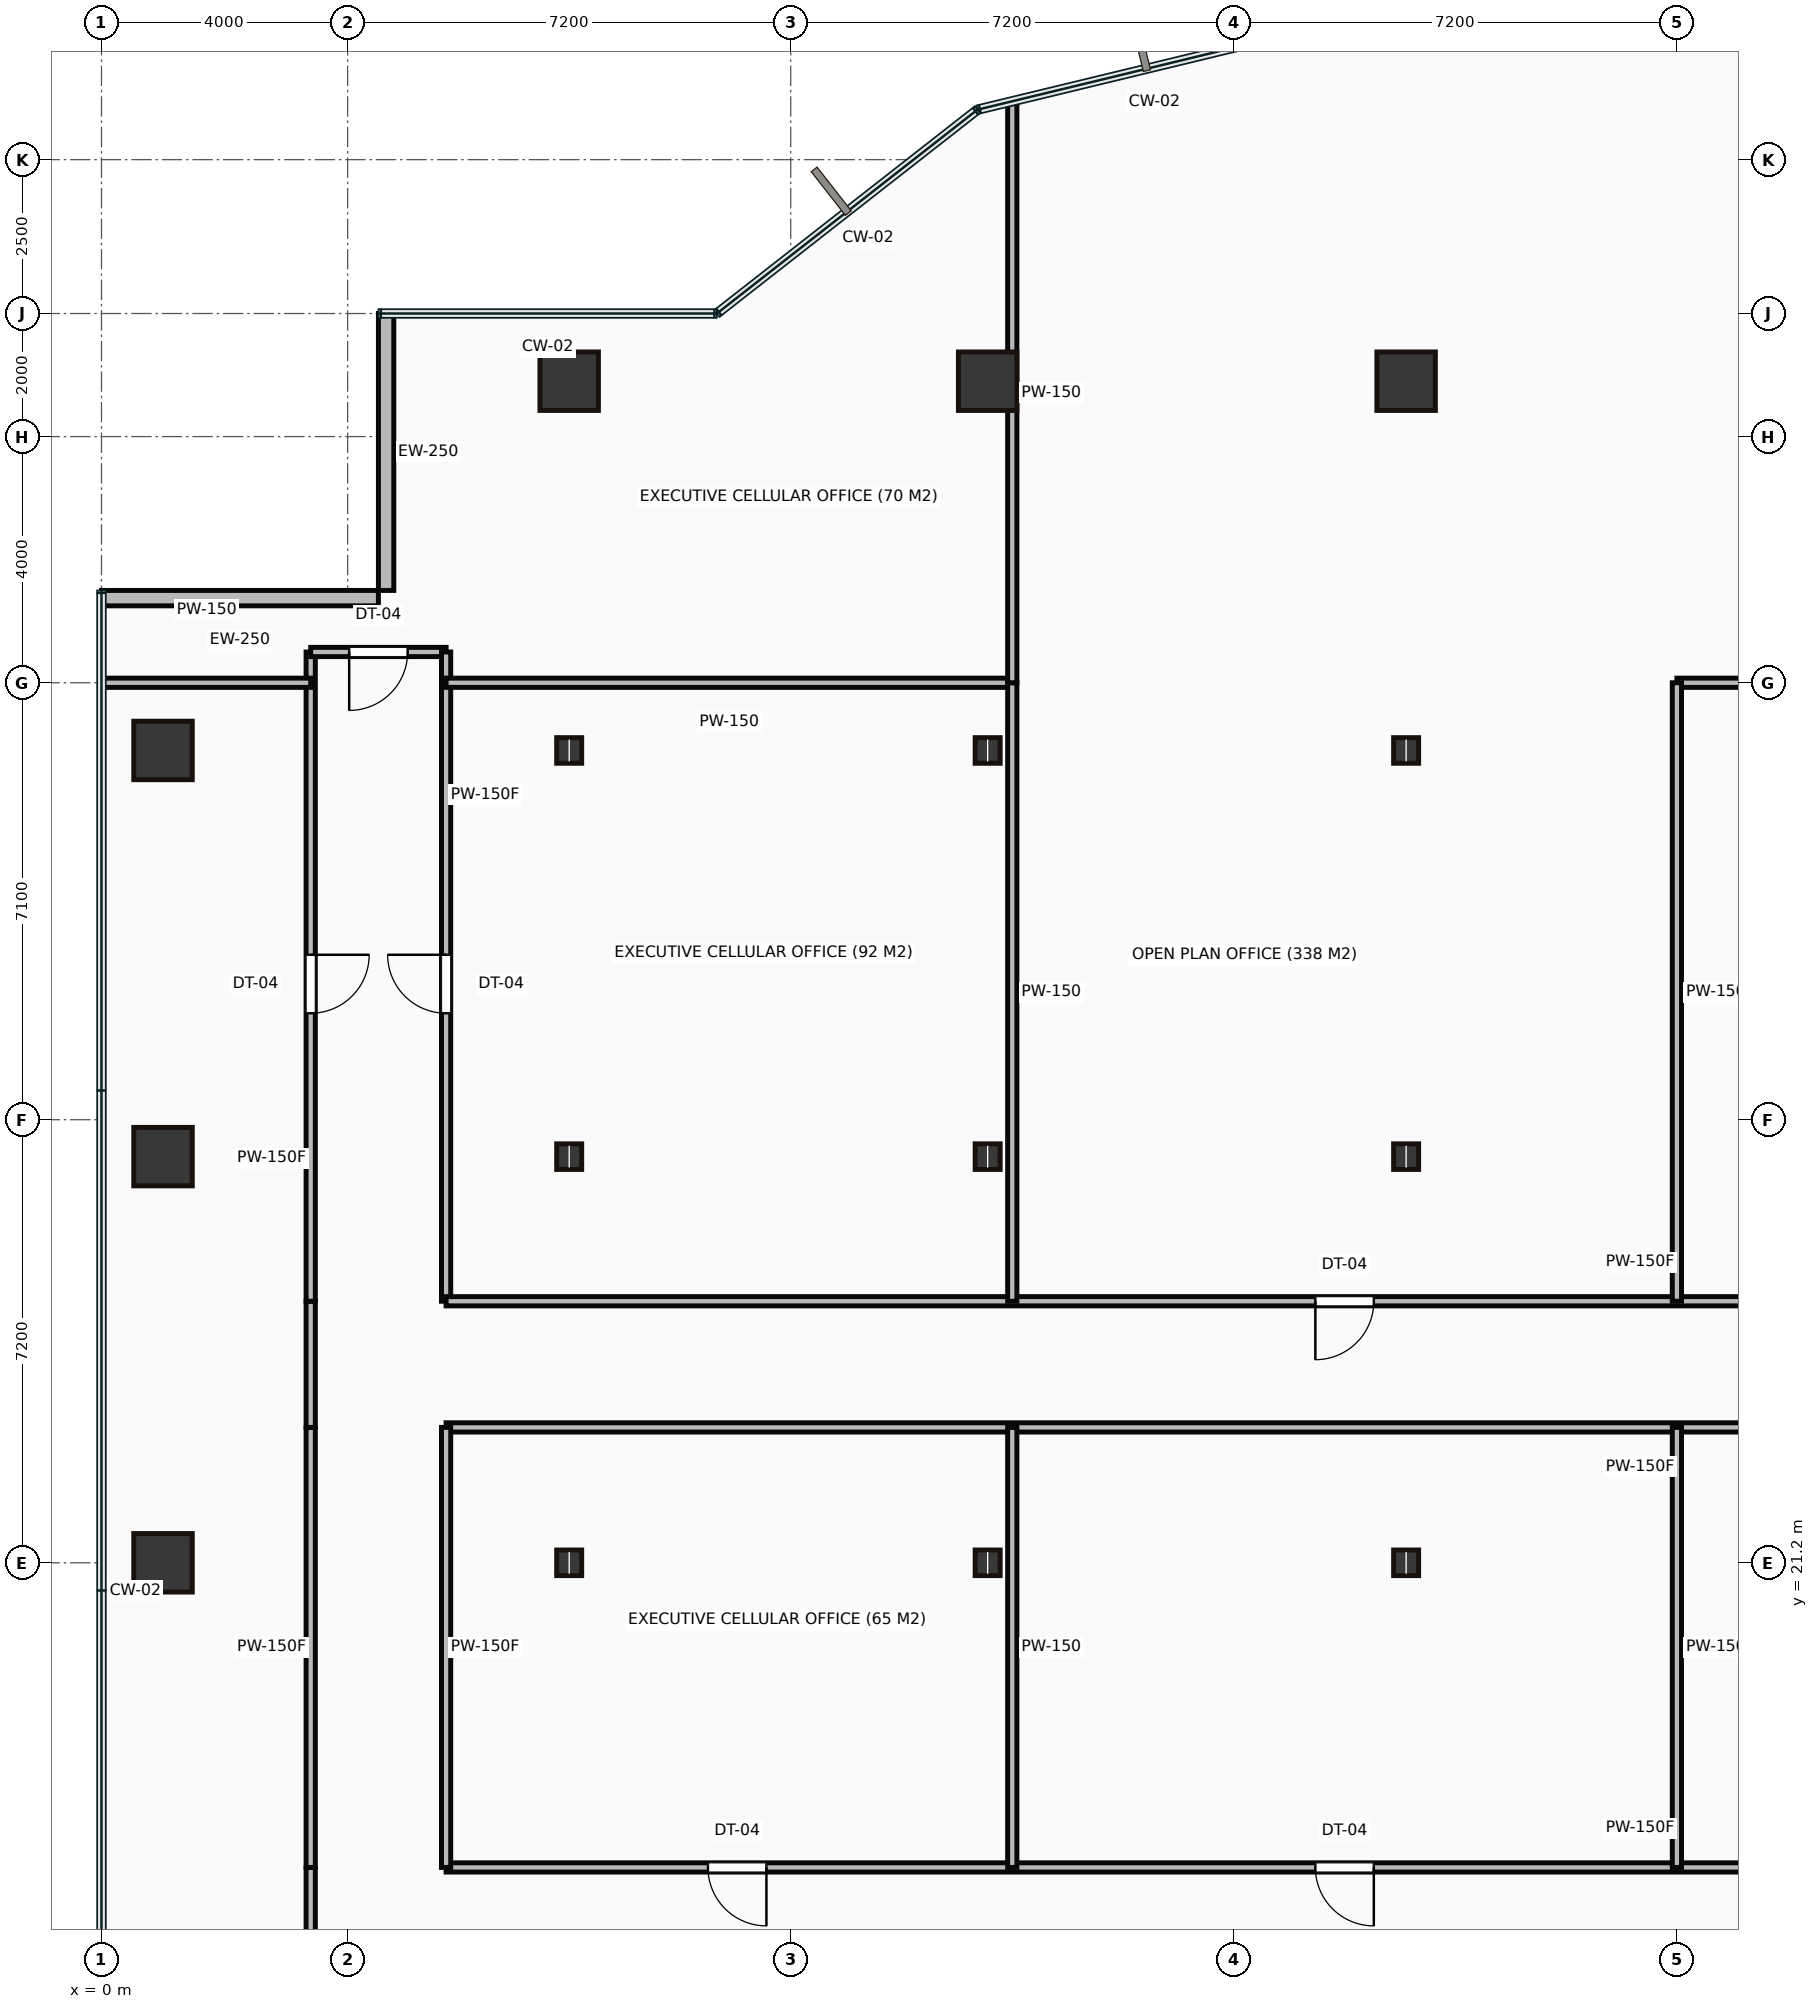
"""IFC4 building model, lengths in metres.
Left out: names, types, materials, properties, quantities, classifications, styles, units other than length and angle.
Written with IfcOpenShell. Run it as: python <this file> out.ifc"""

import sys

from ifc_helpers import new_model, si_unit, direction, frame, frame_2d, origin, origin_2d, place, context, subcontext, project, spatial, rectangle, hollow_rectangle, i_section, extrude, source, transform, mapped, element, fill, save


model = new_model("IFC4")
c1 = context("Model", 3, precision=1e-05, world=origin(), true_north=direction((0.0, 1.0)))
c2 = subcontext(c1, "Body", "Model", "MODEL_VIEW")
j1 = project(units=[si_unit("LENGTHUNIT", "METRE"), si_unit("PLANEANGLEUNIT", "RADIAN")], contexts=[c1])
p1 = place(None, origin())
s1 = spatial("IfcSite", under=j1, at=p1, CompositionType="ELEMENT")
p2 = place(p1, origin())
s2 = spatial("IfcBuilding", under=s1, at=p2, CompositionType="ELEMENT")
p3 = place(p2, frame((0.0, 0.0, 32.5)))
s3 = spatial("IfcBuildingStorey", under=s2, at=p3, CompositionType="ELEMENT", Elevation=32.5)
m1 = source(origin(), c2, "Body", "SweptSolid", [
    extrude(hollow_rectangle(XDim=0.95, YDim=0.95, WallThickness=0.045, at=origin_2d()), origin(), (0.0, 0.0, 1.0), 3.65),
])
for number, where, z_axis, x_axis in (
    (1, (1.0, 21.2, 0.0), (0.0, 0.0, 1.0), (1.0, 0.0, 0.0)),
    (2, (1.0, 27.8, 0.0), (0.0, 0.0, 1.0), (1.0, 0.0, 0.0)),
    (3, (1.0, 34.4, 0.0), (0.0, 0.0, 1.0), (1.0, 0.0, 0.0)),
):
    element("IfcColumn", number, at=place(p3, frame(where, z_axis=z_axis, x_axis=x_axis)), inside=s3, PredefinedType="COLUMN", context=c2, shape_type="MappedRepresentation", body=[
        mapped(m1, transform((0.0, 0.0, 0.0))),
    ])
m2 = source(origin(), c2, "Body", "SweptSolid", [
    extrude(i_section(OverallWidth=0.406, OverallDepth=0.416, WebThickness=0.03, FlangeThickness=0.048, at=origin_2d()), origin(), (0.0, 0.0, 1.0), 3.65),
])
for number, where, z_axis, x_axis in (
    (4, (7.6, 21.2, 0.0), (0.0, 0.0, 1.0), (1.0, 0.0, 0.0)),
    (5, (7.6, 27.8, 0.0), (0.0, 0.0, 1.0), (1.0, 0.0, 0.0)),
    (6, (7.6, 34.4, 0.0), (0.0, 0.0, 1.0), (1.0, 0.0, 0.0)),
):
    element("IfcColumn", number, at=place(p3, frame(where, z_axis=z_axis, x_axis=x_axis)), inside=s3, PredefinedType="COLUMN", context=c2, shape_type="MappedRepresentation", body=[
        mapped(m2, transform((0.0, 0.0, 0.0))),
    ])
p4 = place(p3, frame((7.6, 40.4, 0.0), z_axis=(0.0, 0.0, 1.0), x_axis=(1.0, 0.0, 0.0)))
e7 = element("IfcColumn", 7, at=p4, inside=s3, PredefinedType="COLUMN", context=c2, shape_type="MappedRepresentation", body=[
    mapped(m1, transform((0.0, 0.0, 0.0))),
])
for number, where, z_axis, x_axis in (
    (8, (14.4, 21.2, 0.0), (0.0, 0.0, 1.0), (1.0, 0.0, 0.0)),
    (9, (14.4, 27.8, 0.0), (0.0, 0.0, 1.0), (1.0, 0.0, 0.0)),
    (10, (14.4, 34.4, 0.0), (0.0, 0.0, 1.0), (1.0, 0.0, 0.0)),
):
    element("IfcColumn", number, at=place(p3, frame(where, z_axis=z_axis, x_axis=x_axis)), inside=s3, PredefinedType="COLUMN", context=c2, shape_type="MappedRepresentation", body=[
        mapped(m2, transform((0.0, 0.0, 0.0))),
    ])
p5 = place(p3, frame((14.4, 40.4, 0.0), z_axis=(0.0, 0.0, 1.0), x_axis=(1.0, 0.0, 0.0)))
e11 = element("IfcColumn", 11, at=p5, inside=s3, PredefinedType="COLUMN", context=c2, shape_type="MappedRepresentation", body=[
    mapped(m1, transform((0.0, 0.0, 0.0))),
])
for number, where, z_axis, x_axis in (
    (12, (21.2, 21.2, 0.0), (0.0, 0.0, 1.0), (1.0, 0.0, 0.0)),
    (13, (21.2, 27.8, 0.0), (0.0, 0.0, 1.0), (1.0, 0.0, 0.0)),
    (14, (21.2, 34.4, 0.0), (0.0, 0.0, 1.0), (1.0, 0.0, 0.0)),
):
    element("IfcColumn", number, at=place(p3, frame(where, z_axis=z_axis, x_axis=x_axis)), inside=s3, PredefinedType="COLUMN", context=c2, shape_type="MappedRepresentation", body=[
        mapped(m2, transform((0.0, 0.0, 0.0))),
    ])
p6 = place(p3, frame((21.2, 40.4, 0.0), z_axis=(0.0, 0.0, 1.0), x_axis=(1.0, 0.0, 0.0)))
e15 = element("IfcColumn", 15, at=p6, inside=s3, PredefinedType="COLUMN", context=c2, shape_type="MappedRepresentation", body=[
    mapped(m1, transform((0.0, 0.0, 0.0))),
])
m3 = source(origin(), c2, "Body", "SweptSolid", [
    extrude(rectangle(XDim=4.5, YDim=0.25, at=frame_2d((2.25, 0.0))), origin(), (0.0, 0.0, 1.0), 3.4),
])
for number, where, z_axis, x_axis in (
    (16, (4.625, 41.5, 0.0), (0.0, 0.0, 1.0), (0.0, -1.0, 0.0)),
    (17, (4.5, 36.875, 0.0), (0.0, 0.0, 1.0), (-1.0, 0.0, 0.0)),
):
    element("IfcWall", number, at=place(p3, frame(where, z_axis=z_axis, x_axis=x_axis)), inside=s3, PredefinedType="STANDARD", context=c2, shape_type="MappedRepresentation", body=[
        mapped(m3, transform((0.0, 0.0, 0.0))),
    ])
m4 = source(origin(), c2, "Body", "SweptSolid", [
    extrude(rectangle(XDim=2.25, YDim=0.15, at=frame_2d((1.125, 0.0))), origin(), (0.0, 0.0, 1.0), 3.4),
])
p7 = place(p3, frame((3.4, 14.0, 0.0), z_axis=(0.0, 0.0, 1.0), x_axis=(0.0, 1.0, 0.0)))
e18 = element("IfcWall", 18, at=p7, inside=s3, PredefinedType="PARTITIONING", context=c2, shape_type="MappedRepresentation", body=[
    mapped(m4, transform((0.0, 0.0, 0.0))),
])
m5 = source(origin(), c2, "Body", "SweptSolid", [
    extrude(rectangle(XDim=7.15, YDim=0.15, at=frame_2d((3.575, 0.0))), origin(), (0.0, 0.0, 1.0), 3.4),
])
p8 = place(p3, frame((3.4, 16.25, 0.0), z_axis=(0.0, 0.0, 1.0), x_axis=(0.0, 1.0, 0.0)))
e19 = element("IfcWall", 19, at=p8, inside=s3, PredefinedType="PARTITIONING", context=c2, shape_type="MappedRepresentation", body=[
    mapped(m5, transform((0.0, 0.0, 0.0))),
])
m6 = source(origin(), c2, "Body", "SweptSolid", [
    extrude(rectangle(XDim=2.05, YDim=0.15, at=frame_2d((1.025, 0.0))), origin(), (0.0, 0.0, 1.0), 3.4),
])
p9 = place(p3, frame((3.4, 23.4, 0.0), z_axis=(0.0, 0.0, 1.0), x_axis=(0.0, 1.0, 0.0)))
e20 = element("IfcWall", 20, at=p9, inside=s3, PredefinedType="PARTITIONING", context=c2, shape_type="MappedRepresentation", body=[
    mapped(m6, transform((0.0, 0.0, 0.0))),
])
m7 = source(origin(), c2, "Body", "SweptSolid", [
    extrude(rectangle(XDim=10.55, YDim=0.15, at=frame_2d((5.275, 0.0))), origin(), (0.0, 0.0, 1.0), 3.4),
])
p10 = place(p3, frame((3.4, 25.45, 0.0), z_axis=(0.0, 0.0, 1.0), x_axis=(0.0, 1.0, 0.0)))
e21 = element("IfcWall", 21, at=p10, inside=s3, PredefinedType="PARTITIONING", context=c2, shape_type="MappedRepresentation", body=[
    mapped(m7, transform((0.0, 0.0, 0.0))),
])
p11 = place(p10, frame((4.68, 0.0, 0.0)))
e22 = element("IfcOpeningElement", 22, at=p11, cuts=e21, PredefinedType="OPENING", context=c2, shape_type="SweptSolid", body=[
    extrude(rectangle(XDim=0.95, YDim=2.15, at=frame_2d((0.475, 1.075))), frame((0.0, 0.085, 0.0), z_axis=(0.0, -1.0, 0.0), x_axis=(1.0, 0.0, 0.0)), (0.0, 0.0, 1.0), 0.17),
])
m8 = source(origin(), c2, "Body", "SweptSolid", [
    extrude(rectangle(XDim=2.2, YDim=0.15, at=frame_2d((1.1, 0.0))), origin(), (0.0, 0.0, 1.0), 3.4),
])
p12 = place(p3, frame((3.4, 36.0, 0.0), z_axis=(0.0, 0.0, 1.0), x_axis=(1.0, 0.0, 0.0)))
e23 = element("IfcWall", 23, at=p12, inside=s3, PredefinedType="PARTITIONING", context=c2, shape_type="MappedRepresentation", body=[
    mapped(m8, transform((0.0, 0.0, 0.0))),
])
p13 = place(p12, frame((0.625, 0.0, 0.0)))
e24 = element("IfcOpeningElement", 24, at=p13, cuts=e23, PredefinedType="OPENING", context=c2, shape_type="SweptSolid", body=[
    extrude(rectangle(XDim=0.95, YDim=2.15, at=frame_2d((0.475, 1.075))), frame((0.0, 0.085, 0.0), z_axis=(0.0, -1.0, 0.0), x_axis=(1.0, 0.0, 0.0)), (0.0, 0.0, 1.0), 0.17),
])
p14 = place(p3, frame((5.6, 36.0, 0.0), z_axis=(0.0, 0.0, 1.0), x_axis=(0.0, -1.0, 0.0)))
e25 = element("IfcWall", 25, at=p14, inside=s3, PredefinedType="PARTITIONING", context=c2, shape_type="MappedRepresentation", body=[
    mapped(m7, transform((0.0, 0.0, 0.0))),
])
p15 = place(p14, frame((4.92, 0.0, 0.0)))
e26 = element("IfcOpeningElement", 26, at=p15, cuts=e25, PredefinedType="OPENING", context=c2, shape_type="SweptSolid", body=[
    extrude(rectangle(XDim=0.95, YDim=2.15, at=frame_2d((0.475, 1.075))), frame((0.0, 0.085, 0.0), z_axis=(0.0, -1.0, 0.0), x_axis=(1.0, 0.0, 0.0)), (0.0, 0.0, 1.0), 0.17),
])
m9 = source(origin(), c2, "Body", "SweptSolid", [
    extrude(rectangle(XDim=38.8, YDim=0.15, at=frame_2d((19.4, 0.0))), origin(), (0.0, 0.0, 1.0), 3.4),
])
p16 = place(p3, frame((5.6, 25.45, 0.0), z_axis=(0.0, 0.0, 1.0), x_axis=(1.0, 0.0, 0.0)))
e27 = element("IfcWall", 27, at=p16, inside=s3, PredefinedType="PARTITIONING", context=c2, shape_type="MappedRepresentation", body=[
    mapped(m9, transform((0.0, 0.0, 0.0))),
])
p17 = place(p16, frame((14.125, 0.0, 0.0)))
e28 = element("IfcOpeningElement", 28, at=p17, cuts=e27, PredefinedType="OPENING", context=c2, shape_type="SweptSolid", body=[
    extrude(rectangle(XDim=0.95, YDim=2.15, at=frame_2d((0.475, 1.075))), frame((0.0, 0.085, 0.0), z_axis=(0.0, -1.0, 0.0), x_axis=(1.0, 0.0, 0.0)), (0.0, 0.0, 1.0), 0.17),
])
p18 = place(p16, frame((24.925, 0.0, 0.0)))
e29 = element("IfcOpeningElement", 29, at=p18, cuts=e27, PredefinedType="OPENING", context=c2, shape_type="SweptSolid", body=[
    extrude(rectangle(XDim=0.95, YDim=2.15, at=frame_2d((0.475, 1.075))), frame((0.0, 0.085, 0.0), z_axis=(0.0, -1.0, 0.0), x_axis=(1.0, 0.0, 0.0)), (0.0, 0.0, 1.0), 0.17),
])
p19 = place(p3, frame((5.6, 16.25, 0.0), z_axis=(0.0, 0.0, 1.0), x_axis=(1.0, 0.0, 0.0)))
e30 = element("IfcWall", 30, at=p19, inside=s3, PredefinedType="PARTITIONING", context=c2, shape_type="MappedRepresentation", body=[
    mapped(m9, transform((0.0, 0.0, 0.0))),
])
p20 = place(p19, frame((4.255, 0.0, 0.0)))
e31 = element("IfcOpeningElement", 31, at=p20, cuts=e30, PredefinedType="OPENING", context=c2, shape_type="SweptSolid", body=[
    extrude(rectangle(XDim=0.95, YDim=2.15, at=frame_2d((0.475, 1.075))), frame((0.0, 0.085, 0.0), z_axis=(0.0, -1.0, 0.0), x_axis=(1.0, 0.0, 0.0)), (0.0, 0.0, 1.0), 0.17),
])
p21 = place(p19, frame((14.125, 0.0, 0.0)))
e32 = element("IfcOpeningElement", 32, at=p21, cuts=e30, PredefinedType="OPENING", context=c2, shape_type="SweptSolid", body=[
    extrude(rectangle(XDim=0.95, YDim=2.15, at=frame_2d((0.475, 1.075))), frame((0.0, 0.085, 0.0), z_axis=(0.0, -1.0, 0.0), x_axis=(1.0, 0.0, 0.0)), (0.0, 0.0, 1.0), 0.17),
])
m10 = source(origin(), c2, "Body", "SweptSolid", [
    extrude(rectangle(XDim=38.8, YDim=0.15, at=frame_2d((19.4, 0.0))), origin(), (0.0, 0.0, 1.0), 2.978),
])
p22 = place(p3, frame((44.4, 23.4, 0.0), z_axis=(0.0, 0.0, 1.0), x_axis=(-1.0, 0.0, 0.0)))
e33 = element("IfcWall", 33, at=p22, inside=s3, PredefinedType="PARTITIONING", context=c2, shape_type="MappedRepresentation", body=[
    mapped(m10, transform((0.0, 0.0, 0.0))),
])
p23 = place(p22, frame((12.925, 0.0, 0.0)))
e34 = element("IfcOpeningElement", 34, at=p23, cuts=e33, PredefinedType="OPENING", context=c2, shape_type="SweptSolid", body=[
    extrude(rectangle(XDim=0.95, YDim=2.15, at=frame_2d((0.475, 1.075))), frame((0.0, 0.085, 0.0), z_axis=(0.0, -1.0, 0.0), x_axis=(1.0, 0.0, 0.0)), (0.0, 0.0, 1.0), 0.17),
])
p24 = place(p22, frame((3.655, 0.0, 0.0)))
e35 = element("IfcOpeningElement", 35, at=p24, cuts=e33, PredefinedType="OPENING", context=c2, shape_type="SweptSolid", body=[
    extrude(rectangle(XDim=0.95, YDim=2.15, at=frame_2d((0.475, 1.075))), frame((0.0, 0.085, 0.0), z_axis=(0.0, -1.0, 0.0), x_axis=(1.0, 0.0, 0.0)), (0.0, 0.0, 1.0), 0.17),
])
p25 = place(p3, frame((5.6, 23.4, 0.0), z_axis=(0.0, 0.0, 1.0), x_axis=(0.0, -1.0, 0.0)))
e36 = element("IfcWall", 36, at=p25, inside=s3, PredefinedType="PARTITIONING", context=c2, shape_type="MappedRepresentation", body=[
    mapped(m5, transform((0.0, 0.0, 0.0))),
])
m11 = source(origin(), c2, "Body", "SweptSolid", [
    extrude(rectangle(XDim=3.38, YDim=0.15, at=frame_2d((1.69, 0.0))), origin(), (0.0, 0.0, 1.0), 3.4),
])
p26 = place(p3, frame((0.02, 35.5, 0.0), z_axis=(0.0, 0.0, 1.0), x_axis=(1.0, 0.0, 0.0)))
e37 = element("IfcWall", 37, at=p26, inside=s3, PredefinedType="PARTITIONING", context=c2, shape_type="MappedRepresentation", body=[
    mapped(m11, transform((0.0, 0.0, 0.0))),
])
m12 = source(origin(), c2, "Body", "SweptSolid", [
    extrude(rectangle(XDim=9.2, YDim=0.15, at=frame_2d((4.6, 0.0))), origin(), (0.0, 0.0, 1.0), 3.4),
])
p27 = place(p3, frame((14.8, 35.5, 0.0), z_axis=(0.0, 0.0, 1.0), x_axis=(-1.0, 0.0, 0.0)))
e38 = element("IfcWall", 38, at=p27, inside=s3, PredefinedType="PARTITIONING", context=c2, shape_type="MappedRepresentation", body=[
    mapped(m12, transform((0.0, 0.0, 0.0))),
])
p28 = place(p3, frame((14.8, 23.4, 0.0), z_axis=(0.0, 0.0, 1.0), x_axis=(0.0, -1.0, 0.0)))
e39 = element("IfcWall", 39, at=p28, inside=s3, PredefinedType="PARTITIONING", context=c2, shape_type="MappedRepresentation", body=[
    mapped(m5, transform((0.0, 0.0, 0.0))),
])
m13 = source(origin(), c2, "Body", "SweptSolid", [
    extrude(rectangle(XDim=10.05, YDim=0.15, at=frame_2d((5.025, 0.0))), origin(), (0.0, 0.0, 1.0), 3.4),
])
p29 = place(p3, frame((14.8, 35.5, 0.0), z_axis=(0.0, 0.0, 1.0), x_axis=(0.0, -1.0, 0.0)))
e40 = element("IfcWall", 40, at=p29, inside=s3, PredefinedType="PARTITIONING", context=c2, shape_type="MappedRepresentation", body=[
    mapped(m13, transform((0.0, 0.0, 0.0))),
])
m14 = source(origin(), c2, "Body", "SweptSolid", [
    extrude(rectangle(XDim=9.428, YDim=0.15, at=frame_2d((4.714, 0.0))), origin(), (0.0, 0.0, 1.0), 3.4),
])
p30 = place(p3, frame((14.8, 44.928, 0.0), z_axis=(0.0, 0.0, 1.0), x_axis=(0.0, -1.0, 0.0)))
e41 = element("IfcWall", 41, at=p30, inside=s3, PredefinedType="PARTITIONING", context=c2, shape_type="MappedRepresentation", body=[
    mapped(m14, transform((0.0, 0.0, 0.0))),
])
p31 = place(p3, frame((25.6, 23.4, 0.0), z_axis=(0.0, 0.0, 1.0), x_axis=(0.0, -1.0, 0.0)))
e42 = element("IfcWall", 42, at=p31, inside=s3, PredefinedType="PARTITIONING", context=c2, shape_type="MappedRepresentation", body=[
    mapped(m5, transform((0.0, 0.0, 0.0))),
])
m15 = source(origin(), c2, "Body", "SweptSolid", [
    extrude(rectangle(XDim=10.8, YDim=0.15, at=frame_2d((5.4, 0.0))), origin(), (0.0, 0.0, 1.0), 3.4),
])
p32 = place(p3, frame((36.4, 35.5, 0.0), z_axis=(0.0, 0.0, 1.0), x_axis=(-1.0, 0.0, 0.0)))
e43 = element("IfcWall", 43, at=p32, inside=s3, PredefinedType="PARTITIONING", context=c2, shape_type="MappedRepresentation", body=[
    mapped(m15, transform((0.0, 0.0, 0.0))),
])
p33 = place(p3, frame((25.6, 35.5, 0.0), z_axis=(0.0, 0.0, 1.0), x_axis=(0.0, -1.0, 0.0)))
e44 = element("IfcWall", 44, at=p33, inside=s3, PredefinedType="PARTITIONING", context=c2, shape_type="MappedRepresentation", body=[
    mapped(m13, transform((0.0, 0.0, 0.0))),
])
m16 = source(origin(), c2, "Body", "SweptSolid", [
    extrude(rectangle(XDim=0.95, YDim=2.15, at=frame_2d((0.475, 1.075))), frame((0.0, 0.025, 0.0), z_axis=(0.0, -1.0, 0.0), x_axis=(1.0, 0.0, 0.0)), (0.0, 0.0, 1.0), 0.05),
])
p34 = place(p11, origin())
e45 = element("IfcDoor", 45, at=p34, inside=s3, OperationType="SINGLE_SWING_RIGHT", PredefinedType="DOOR", context=c2, shape_type="MappedRepresentation", body=[
    mapped(m16, transform((0.0, 0.0, 0.0))),
])
fill(e22, e45)
p35 = place(p13, origin())
e46 = element("IfcDoor", 46, at=p35, inside=s3, OperationType="SINGLE_SWING_LEFT", PredefinedType="DOOR", context=c2, shape_type="MappedRepresentation", body=[
    mapped(m16, transform((0.0, 0.0, 0.0))),
])
fill(e24, e46)
p36 = place(p20, origin())
e47 = element("IfcDoor", 47, at=p36, inside=s3, OperationType="SINGLE_SWING_RIGHT", PredefinedType="DOOR", context=c2, shape_type="MappedRepresentation", body=[
    mapped(m16, transform((0.0, 0.0, 0.0))),
])
fill(e31, e47)
p37 = place(p15, origin())
e48 = element("IfcDoor", 48, at=p37, inside=s3, OperationType="SINGLE_SWING_LEFT", PredefinedType="DOOR", context=c2, shape_type="MappedRepresentation", body=[
    mapped(m16, transform((0.0, 0.0, 0.0))),
])
fill(e26, e48)
p38 = place(p21, origin())
e49 = element("IfcDoor", 49, at=p38, inside=s3, OperationType="SINGLE_SWING_RIGHT", PredefinedType="DOOR", context=c2, shape_type="MappedRepresentation", body=[
    mapped(m16, transform((0.0, 0.0, 0.0))),
])
fill(e32, e49)
p39 = place(p17, origin())
e50 = element("IfcDoor", 50, at=p39, inside=s3, OperationType="SINGLE_SWING_LEFT", PredefinedType="DOOR", context=c2, shape_type="MappedRepresentation", body=[
    mapped(m16, transform((0.0, 0.0, 0.0))),
])
fill(e28, e50)
save(model, sys.argv[1])
